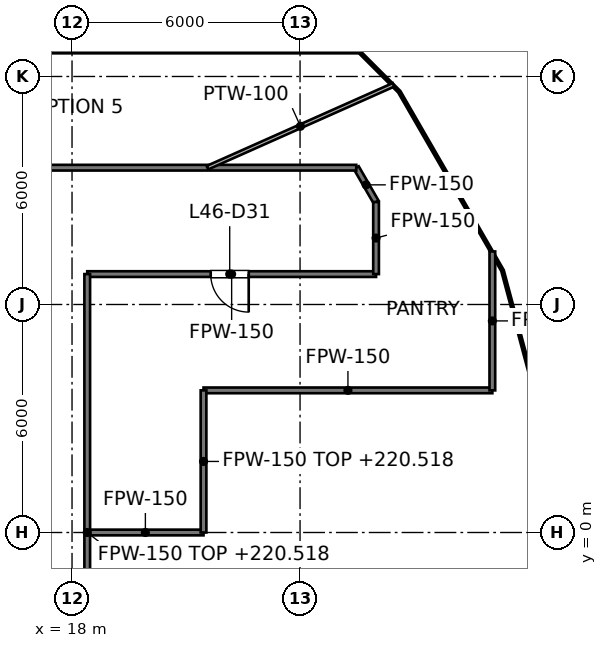
"""IFC4 building model, lengths in metres.
Left out: names, types, materials, properties, quantities, classifications, styles, units other than length and angle.
Written with IfcOpenShell. Run it as: python <this file> out.ifc"""

import sys

from ifc_helpers import new_model, si_unit, direction, frame, frame_2d, origin, place, context, subcontext, project, spatial, rectangle, extrude, element, fill, save


model = new_model("IFC4")
c1 = context("Model", 3, precision=1e-05, world=origin(), true_north=direction((0.0, 1.0)))
c2 = subcontext(c1, "Body", "Model", "MODEL_VIEW")
j1 = project(units=[si_unit("LENGTHUNIT", "METRE"), si_unit("PLANEANGLEUNIT", "RADIAN")], contexts=[c1])
p1 = place(None, origin())
s1 = spatial("IfcSite", under=j1, at=p1, CompositionType="ELEMENT")
p2 = place(p1, origin())
s2 = spatial("IfcBuilding", under=s1, at=p2, CompositionType="ELEMENT")
p3 = place(p2, frame((0.0, 0.0, 217.6)))
s3 = spatial("IfcBuildingStorey", under=s2, at=p3, CompositionType="ELEMENT", Elevation=217.6)
p4 = place(p3, frame((25.479, 9.6, 0.0), z_axis=(0.0, 0.0, 1.0), x_axis=(0.499715696113, -0.8661894845, 0.0)))
e1 = element("IfcWall", 1, at=p4, inside=s3, PredefinedType="PARTITIONING", context=c2, shape_type="SweptSolid", body=[
    extrude(rectangle(XDim=1.042, YDim=0.15, at=frame_2d((0.521, 0.0))), origin(), (0.0, 0.0, 1.0), 2.927),
])
p5 = place(p3, frame((18.4, 0.0, 0.0), z_axis=(0.0, 0.0, 1.0), x_axis=(1.0, 0.0, 0.0)))
e2 = element("IfcWall", 2, at=p5, inside=s3, PredefinedType="PARTITIONING", context=c2, shape_type="SweptSolid", body=[
    extrude(rectangle(XDim=3.06, YDim=0.15, at=frame_2d((1.53, 0.0))), origin(), (0.0, 0.0, 1.0), 2.927),
])
p6 = place(p3, frame((21.46, 3.74, 0.0), z_axis=(0.0, 0.0, 1.0), x_axis=(1.0, 0.0, 0.0)))
e3 = element("IfcWall", 3, at=p6, inside=s3, PredefinedType="PARTITIONING", context=c2, shape_type="SweptSolid", body=[
    extrude(rectangle(XDim=7.6, YDim=0.15, at=frame_2d((3.8, 0.0))), origin(), (0.0, 0.0, 1.0), 2.927),
])
p7 = place(p3, frame((18.4, 6.8, 0.0), z_axis=(0.0, 0.0, 1.0), x_axis=(1.0, 0.0, 0.0)))
e4 = element("IfcWall", 4, at=p7, inside=s3, PredefinedType="PARTITIONING", context=c2, shape_type="SweptSolid", body=[
    extrude(rectangle(XDim=7.6, YDim=0.15, at=frame_2d((3.8, 0.0))), origin(), (0.0, 0.0, 1.0), 2.927),
])
p8 = place(p7, frame((3.249, 0.0, 0.0)))
e5 = element("IfcOpeningElement", 5, at=p8, cuts=e4, PredefinedType="OPENING", context=c2, shape_type="SweptSolid", body=[
    extrude(rectangle(XDim=1.0, YDim=2.1, at=frame_2d((0.5, 1.05))), frame((0.0, 0.075, 0.0), z_axis=(0.0, -1.0, 0.0), x_axis=(1.0, 0.0, 0.0)), (0.0, 0.0, 1.0), 0.15),
])
p9 = place(p3, frame((-25.479, 9.6, 0.0), z_axis=(0.0, 0.0, 1.0), x_axis=(1.0, 0.0, 0.0)))
e6 = element("IfcWall", 6, at=p9, inside=s3, PredefinedType="PARTITIONING", context=c2, shape_type="SweptSolid", body=[
    extrude(rectangle(XDim=50.958, YDim=0.15, at=frame_2d((25.479, 0.0))), origin(), (0.0, 0.0, 1.0), 2.918),
])
p10 = place(p9, frame((28.474, 0.0, 0.0)))
e7 = element("IfcOpeningElement", 7, at=p10, cuts=e6, PredefinedType="OPENING", context=c2, shape_type="SweptSolid", body=[
    extrude(rectangle(XDim=1.0, YDim=2.1, at=frame_2d((0.5, 1.05))), frame((0.0, 0.075, 0.0), z_axis=(0.0, -1.0, 0.0), x_axis=(1.0, 0.0, 0.0)), (0.0, 0.0, 1.0), 0.15),
])
p11 = place(p9, frame((24.607, 0.0, 0.0)))
e8 = element("IfcOpeningElement", 8, at=p11, cuts=e6, PredefinedType="OPENING", context=c2, shape_type="SweptSolid", body=[
    extrude(rectangle(XDim=1.0, YDim=2.1, at=frame_2d((0.5, 1.05))), frame((0.0, 0.075, 0.0), z_axis=(0.0, -1.0, 0.0), x_axis=(1.0, 0.0, 0.0)), (0.0, 0.0, 1.0), 0.15),
])
p12 = place(p9, frame((19.083, 0.0, 0.0)))
e9 = element("IfcOpeningElement", 9, at=p12, cuts=e6, PredefinedType="OPENING", context=c2, shape_type="SweptSolid", body=[
    extrude(rectangle(XDim=1.0, YDim=2.1, at=frame_2d((0.5, 1.05))), frame((0.0, 0.075, 0.0), z_axis=(0.0, -1.0, 0.0), x_axis=(1.0, 0.0, 0.0)), (0.0, 0.0, 1.0), 0.15),
])
p13 = place(p9, frame((13.865, 0.0, 0.0)))
e10 = element("IfcOpeningElement", 10, at=p13, cuts=e6, PredefinedType="OPENING", context=c2, shape_type="SweptSolid", body=[
    extrude(rectangle(XDim=1.0, YDim=2.1, at=frame_2d((0.5, 1.05))), frame((0.0, 0.075, 0.0), z_axis=(0.0, -1.0, 0.0), x_axis=(1.0, 0.0, 0.0)), (0.0, 0.0, 1.0), 0.15),
])
p14 = place(p9, frame((5.826, 0.0, 0.0)))
e11 = element("IfcOpeningElement", 11, at=p14, cuts=e6, PredefinedType="OPENING", context=c2, shape_type="SweptSolid", body=[
    extrude(rectangle(XDim=1.2, YDim=2.1, at=frame_2d((0.6, 1.05))), frame((0.0, 0.075, 0.0), z_axis=(0.0, -1.0, 0.0), x_axis=(1.0, 0.0, 0.0)), (0.0, 0.0, 1.0), 0.15),
])
p15 = place(p9, frame((38.532, 0.0, 0.0)))
e12 = element("IfcOpeningElement", 12, at=p15, cuts=e6, PredefinedType="OPENING", context=c2, shape_type="SweptSolid", body=[
    extrude(rectangle(XDim=1.0, YDim=2.1, at=frame_2d((0.5, 1.05))), frame((0.0, 0.075, 0.0), z_axis=(0.0, -1.0, 0.0), x_axis=(1.0, 0.0, 0.0)), (0.0, 0.0, 1.0), 0.15),
])
p16 = place(p3, frame((29.06, 3.74, 0.0), z_axis=(0.0, 0.0, 1.0), x_axis=(0.0, 1.0, 0.0)))
e13 = element("IfcWall", 13, at=p16, inside=s3, PredefinedType="PARTITIONING", context=c2, shape_type="SweptSolid", body=[
    extrude(rectangle(XDim=3.656, YDim=0.15, at=frame_2d((1.828, 0.0))), origin(), (0.0, 0.0, 1.0), 2.918),
])
p17 = place(p3, frame((26.0, 6.8, 0.0), z_axis=(0.0, 0.0, 1.0), x_axis=(0.0, 1.0, 0.0)))
e14 = element("IfcWall", 14, at=p17, inside=s3, PredefinedType="PARTITIONING", context=c2, shape_type="SweptSolid", body=[
    extrude(rectangle(XDim=1.897, YDim=0.15, at=frame_2d((0.948, 0.0))), origin(), (0.0, 0.0, 1.0), 2.927),
])
p18 = place(p3, frame((21.46, 0.0, 0.0), z_axis=(0.0, 0.0, 1.0), x_axis=(0.0, 1.0, 0.0)))
e15 = element("IfcWall", 15, at=p18, inside=s3, PredefinedType="PARTITIONING", context=c2, shape_type="SweptSolid", body=[
    extrude(rectangle(XDim=3.74, YDim=0.15, at=frame_2d((1.87, 0.0))), origin(), (0.0, 0.0, 1.0), 2.918),
])
p19 = place(p3, frame((18.4, -6.8, 0.0), z_axis=(0.0, 0.0, 1.0), x_axis=(0.0, 1.0, 0.0)))
e16 = element("IfcWall", 16, at=p19, inside=s3, PredefinedType="PARTITIONING", context=c2, shape_type="SweptSolid", body=[
    extrude(rectangle(XDim=13.6, YDim=0.15, at=frame_2d((6.8, 0.0))), origin(), (0.0, 0.0, 1.0), 2.918),
])
p20 = place(p3, frame((-16.651, 12.66, 0.0), z_axis=(0.0, 0.0, 1.0), x_axis=(1.0, 0.0, 0.0)))
e17 = element("IfcWall", 17, at=p20, inside=s3, PredefinedType="PARTITIONING", context=c2, shape_type="SweptSolid", body=[
    extrude(rectangle(XDim=42.229, YDim=0.1, at=frame_2d((21.114, 0.0))), origin(), (0.0, 0.0, 1.0), 2.918),
])
p21 = place(p20, frame((8.027, 0.0, 0.0)))
e18 = element("IfcOpeningElement", 18, at=p21, cuts=e17, PredefinedType="OPENING", context=c2, shape_type="SweptSolid", body=[
    extrude(rectangle(XDim=1.8, YDim=2.1, at=frame_2d((0.9, 1.05))), frame((0.0, 0.05, 0.0), z_axis=(0.0, -1.0, 0.0), x_axis=(1.0, 0.0, 0.0)), (0.0, 0.0, 1.0), 0.1),
])
p22 = place(p20, frame((32.595, 0.0, 0.0)))
e19 = element("IfcOpeningElement", 19, at=p22, cuts=e17, PredefinedType="OPENING", context=c2, shape_type="SweptSolid", body=[
    extrude(rectangle(XDim=0.9, YDim=2.1, at=frame_2d((0.45, 1.05))), frame((0.0, 0.05, 0.0), z_axis=(0.0, -1.0, 0.0), x_axis=(1.0, 0.0, 0.0)), (0.0, 0.0, 1.0), 0.1),
])
p23 = place(p3, frame((21.563, 9.6, 0.0), z_axis=(0.0, 0.0, 1.0), x_axis=(0.913508804139, 0.406818958212, 0.0)))
e20 = element("IfcWall", 20, at=p23, inside=s3, PredefinedType="PARTITIONING", context=c2, shape_type="SweptSolid", body=[
    extrude(rectangle(XDim=5.358, YDim=0.1, at=frame_2d((2.679, 0.0))), origin(), (0.0, 0.0, 1.0), 2.927),
])
p24 = place(p8, origin())
e21 = element("IfcDoor", 21, at=p24, inside=s3, OperationType="SINGLE_SWING_RIGHT", PredefinedType="DOOR", context=c2, shape_type="SweptSolid", body=[
    extrude(rectangle(XDim=1.0, YDim=2.1, at=frame_2d((0.5, 1.05))), frame((0.0, 0.025, 0.0), z_axis=(0.0, -1.0, 0.0), x_axis=(1.0, 0.0, 0.0)), (0.0, 0.0, 1.0), 0.05),
])
fill(e5, e21)
save(model, sys.argv[1])
